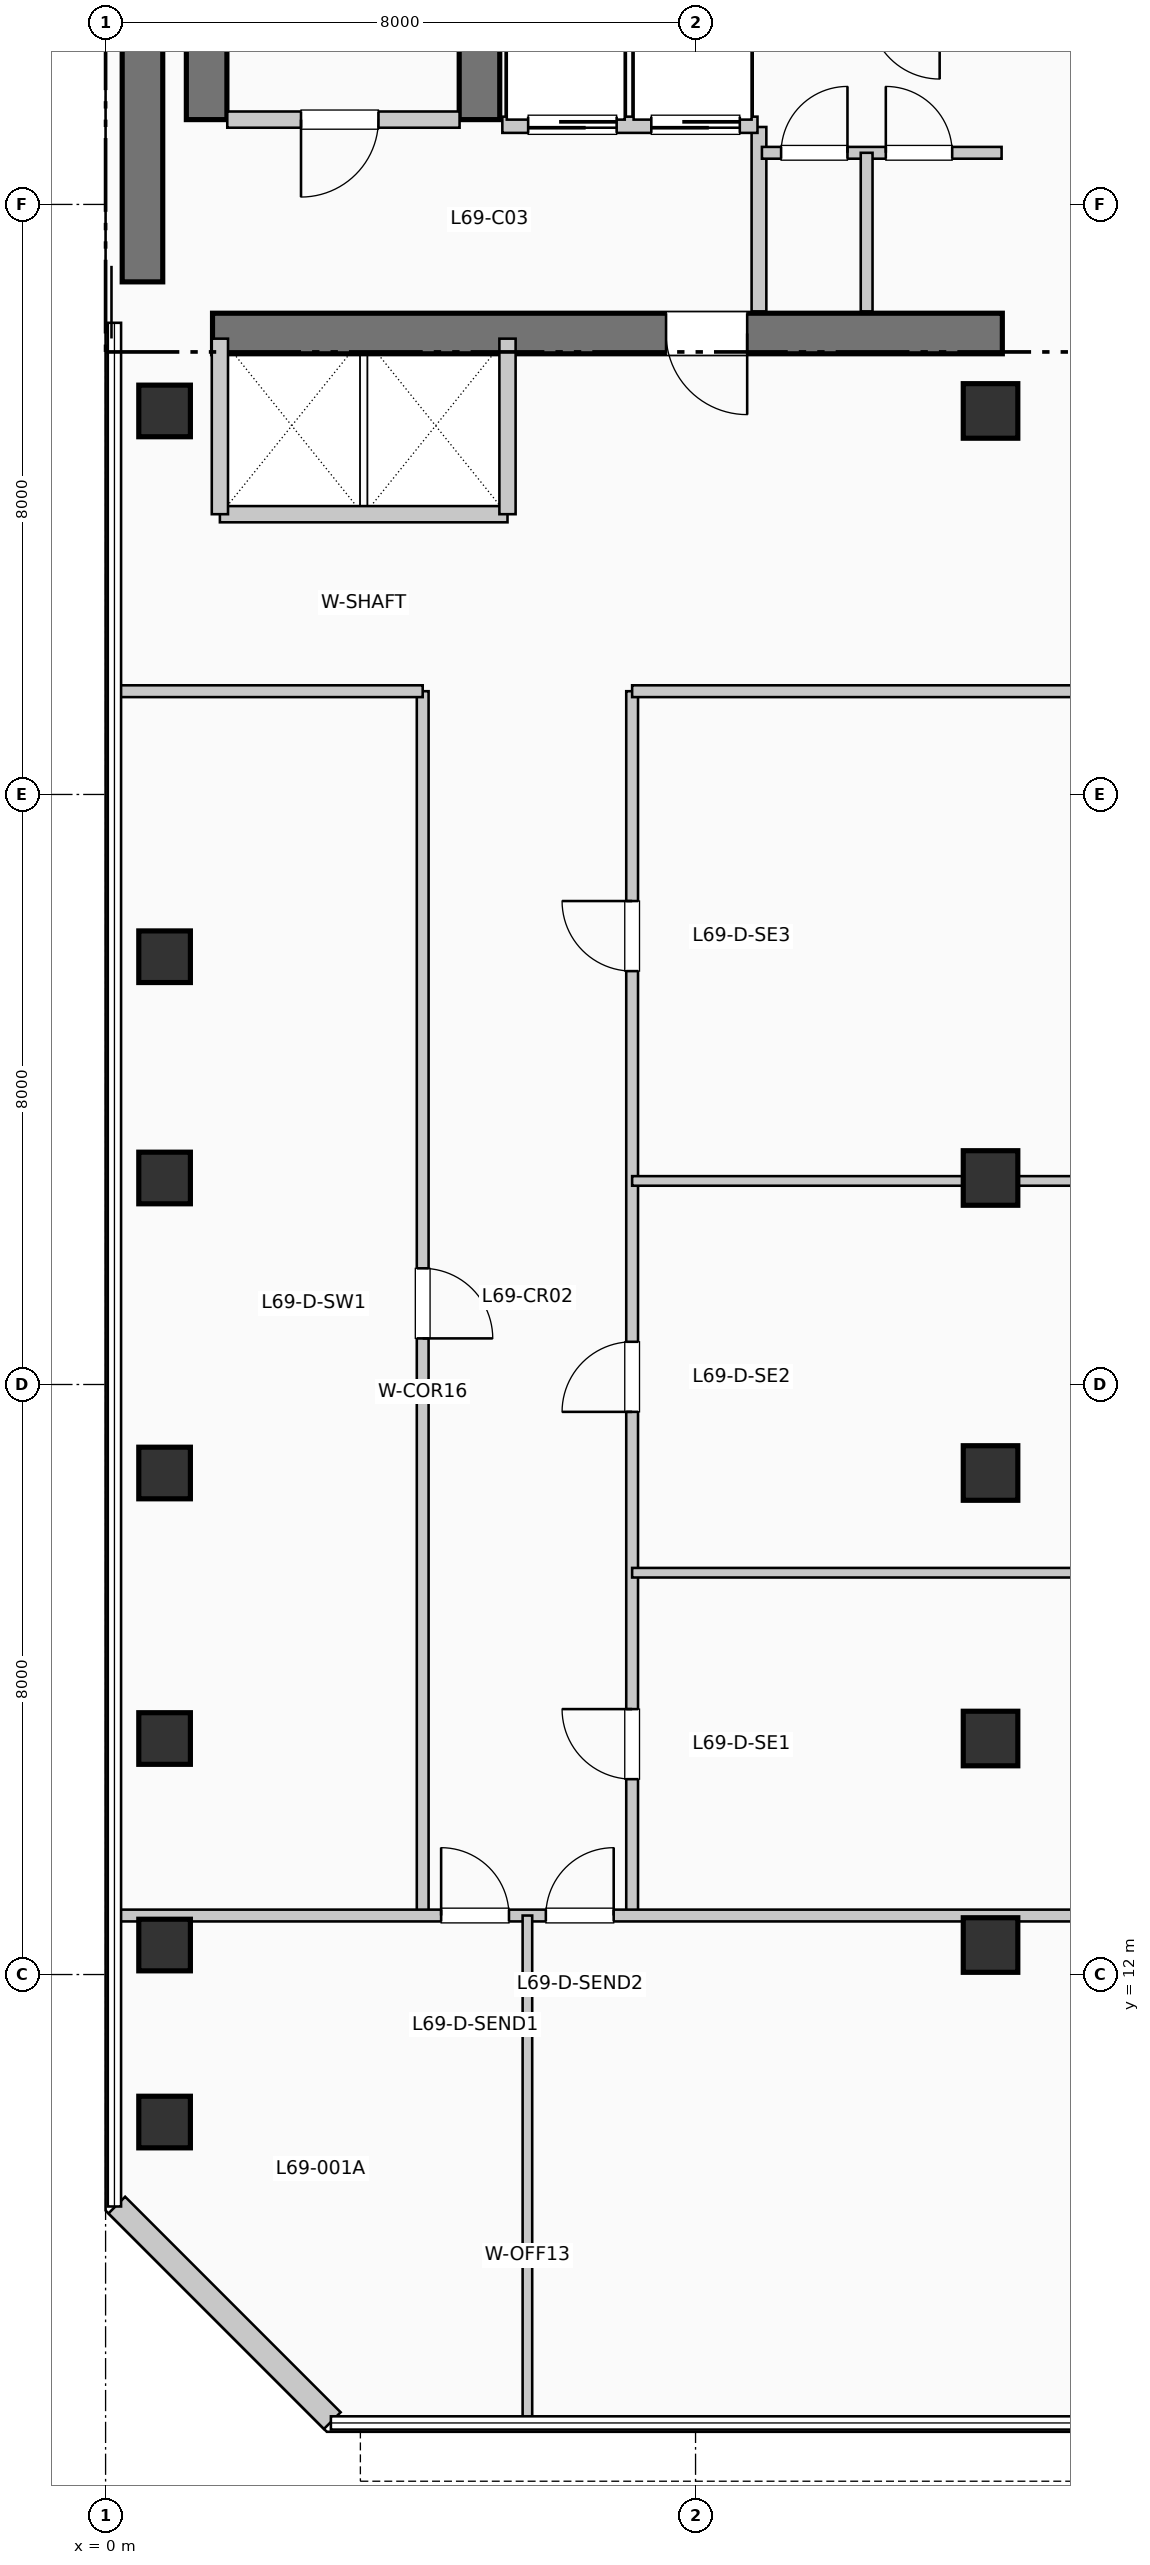
"""IFC4 building model, lengths in metres.
Left out: names, types, materials, properties, quantities, classifications, styles, units other than length and angle.
Written with IfcOpenShell. Run it as: python <this file> out.ifc"""

import sys

from ifc_helpers import new_model, si_unit, direction, frame, frame_2d, origin, origin_2d, place, context, subcontext, project, spatial, rectangle, extrude, element, fill, save


model = new_model("IFC4")
c1 = context("Model", 3, precision=1e-05, world=origin(), true_north=direction((0.0, 1.0)))
c2 = subcontext(c1, "Body", "Model", "MODEL_VIEW")
j1 = project(units=[si_unit("LENGTHUNIT", "METRE"), si_unit("PLANEANGLEUNIT", "RADIAN")], contexts=[c1])
p1 = place(None, origin())
s1 = spatial("IfcSite", under=j1, at=p1, CompositionType="ELEMENT")
p2 = place(p1, origin())
s2 = spatial("IfcBuilding", under=s1, at=p2, CompositionType="ELEMENT")
p3 = place(p2, frame((0.0, 0.0, 284.13)))
s3 = spatial("IfcBuildingStorey", under=s2, at=p3, CompositionType="ELEMENT", Elevation=284.13)
p4 = place(p3, frame((0.5, 34.95, 0.0), z_axis=(0.0, 0.0, 1.0), x_axis=(0.0, 1.0, 0.0)))
e1 = element("IfcWall", 1, at=p4, inside=s3, PredefinedType="SHEAR", context=c2, shape_type="SweptSolid", body=[
    extrude(rectangle(XDim=7.9, YDim=0.55, at=frame_2d((3.95, 0.0))), origin(), (0.0, 0.0, 1.0), 3.96),
])
p5 = place(p3, frame((1.45, 34.25, 0.0), z_axis=(0.0, 0.0, 1.0), x_axis=(1.0, 0.0, 0.0)))
e2 = element("IfcWall", 2, at=p5, inside=s3, PredefinedType="SHEAR", context=c2, shape_type="SweptSolid", body=[
    extrude(rectangle(XDim=10.71, YDim=0.55, at=frame_2d((5.355, 0.0))), origin(), (0.0, 0.0, 1.0), 3.96),
])
p6 = place(p5, frame((7.25, 0.0, 0.0), z_axis=(0.0, 0.0, 1.0), x_axis=(-1.0, 0.0, 0.0)))
e3 = element("IfcOpeningElement", 3, at=p6, cuts=e2, PredefinedType="OPENING", context=c2, shape_type="SweptSolid", body=[
    extrude(rectangle(XDim=1.1, YDim=2.15, at=frame_2d((0.55, 1.075))), frame((0.0, 0.285, 0.0), z_axis=(0.0, -1.0, 0.0), x_axis=(1.0, 0.0, 0.0)), (0.0, 0.0, 1.0), 0.57),
])
for number, where, z_axis, x_axis in (
    (4, (1.37, 37.15, 0.0), (0.0, 0.0, 1.0), (0.0, 1.0, 0.0)),
    (5, (5.07, 37.15, 0.0), (0.0, 0.0, 1.0), (0.0, 1.0, 0.0)),
):
    element("IfcWall", number, at=place(p3, frame(where, z_axis=z_axis, x_axis=x_axis)), inside=s3, PredefinedType="SHEAR", context=c2, shape_type="SweptSolid", body=[
        extrude(rectangle(XDim=7.89, YDim=0.55, at=frame_2d((3.945, 0.0))), origin(), (0.0, 0.0, 1.0), 3.96),
    ])
for number, where, z_axis, x_axis in (
    (6, (0.8, 10.0, 0.0), (0.0, 0.0, 1.0), (1.0, 0.0, 0.0)),
    (7, (0.8, 12.4, 0.0), (0.0, 0.0, 1.0), (1.0, 0.0, 0.0)),
    (8, (0.8, 15.2, 0.0), (0.0, 0.0, 1.0), (1.0, 0.0, 0.0)),
    (9, (0.8, 18.8, 0.0), (0.0, 0.0, 1.0), (1.0, 0.0, 0.0)),
    (10, (0.8, 22.8, 0.0), (0.0, 0.0, 1.0), (1.0, 0.0, 0.0)),
    (11, (0.8, 25.8, 0.0), (0.0, 0.0, 1.0), (1.0, 0.0, 0.0)),
    (12, (0.8, 33.2, 0.0), (0.0, 0.0, 1.0), (1.0, 0.0, 0.0)),
):
    element("IfcColumn", number, at=place(p3, frame(where, z_axis=z_axis, x_axis=x_axis)), inside=s3, PredefinedType="COLUMN", context=c2, shape_type="SweptSolid", body=[
        extrude(rectangle(XDim=0.7, YDim=0.7, at=origin_2d()), origin(), (0.0, 0.0, 1.0), 3.96),
    ])
for number, where, z_axis, x_axis in (
    (13, (12.0, 12.4, 0.0), (0.0, 0.0, 1.0), (1.0, 0.0, 0.0)),
    (14, (12.0, 15.2, 0.0), (0.0, 0.0, 1.0), (1.0, 0.0, 0.0)),
    (15, (12.0, 18.8, 0.0), (0.0, 0.0, 1.0), (1.0, 0.0, 0.0)),
    (16, (12.0, 22.8, 0.0), (0.0, 0.0, 1.0), (1.0, 0.0, 0.0)),
    (17, (12.0, 33.2, 0.0), (0.0, 0.0, 1.0), (1.0, 0.0, 0.0)),
):
    element("IfcColumn", number, at=place(p3, frame(where, z_axis=z_axis, x_axis=x_axis)), inside=s3, PredefinedType="COLUMN", context=c2, shape_type="SweptSolid", body=[
        extrude(rectangle(XDim=0.74, YDim=0.74, at=origin_2d()), origin(), (0.0, 0.0, 1.0), 3.96),
    ])
p7 = place(p3, frame((0.152, 8.874, 0.0), z_axis=(0.0, 0.0, 1.0), x_axis=(0.707077242712, -0.707136318428, 0.0)))
e18 = element("IfcWall", 18, at=p7, inside=s3, PredefinedType="SOLIDWALL", context=c2, shape_type="SweptSolid", body=[
    extrude(rectangle(XDim=4.133, YDim=0.32, at=frame_2d((2.066, 0.0))), origin(), (0.0, 0.0, 1.0), 3.74),
])
p8 = place(p3, frame((1.65, 37.15, 0.0), z_axis=(0.0, 0.0, 1.0), x_axis=(1.0, 0.0, 0.0)))
e19 = element("IfcWall", 19, at=p8, inside=s3, PredefinedType="PARTITIONING", context=c2, shape_type="SweptSolid", body=[
    extrude(rectangle(XDim=3.15, YDim=0.22, at=frame_2d((1.575, 0.0))), origin(), (0.0, 0.0, 1.0), 3.74),
])
p9 = place(p8, frame((2.05, 0.0, 0.0), z_axis=(0.0, 0.0, 1.0), x_axis=(-1.0, 0.0, 0.0)))
e20 = element("IfcOpeningElement", 20, at=p9, cuts=e19, PredefinedType="OPENING", context=c2, shape_type="SweptSolid", body=[
    extrude(rectangle(XDim=1.05, YDim=2.15, at=frame_2d((0.525, 1.075))), frame((0.0, 0.12, 0.0), z_axis=(0.0, -1.0, 0.0), x_axis=(1.0, 0.0, 0.0)), (0.0, 0.0, 1.0), 0.24),
])
p10 = place(p3, frame((8.86, 34.55, 0.0), z_axis=(0.0, 0.0, 1.0), x_axis=(0.0, 1.0, 0.0)))
e21 = element("IfcWall", 21, at=p10, inside=s3, PredefinedType="PARTITIONING", context=c2, shape_type="SweptSolid", body=[
    extrude(rectangle(XDim=2.5, YDim=0.2, at=frame_2d((1.25, 0.0))), origin(), (0.0, 0.0, 1.0), 3.74),
])
p11 = place(p3, frame((5.38, 37.08, 0.0), z_axis=(0.0, 0.0, 1.0), x_axis=(1.0, 0.0, 0.0)))
e22 = element("IfcWall", 22, at=p11, inside=s3, PredefinedType="PARTITIONING", context=c2, shape_type="SweptSolid", body=[
    extrude(rectangle(XDim=3.46, YDim=0.22, at=frame_2d((1.73, 0.0))), origin(), (0.0, 0.0, 1.0), 3.74),
])
p12 = place(p11, frame((1.55, 0.0, 0.0), z_axis=(0.0, 0.0, 1.0), x_axis=(-1.0, 0.0, 0.0)))
e23 = element("IfcOpeningElement", 23, at=p12, cuts=e22, PredefinedType="OPENING", context=c2, shape_type="SweptSolid", body=[
    extrude(rectangle(XDim=1.2, YDim=2.2, at=frame_2d((0.6, 1.1))), frame((0.0, 0.12, 0.0), z_axis=(0.0, -1.0, 0.0), x_axis=(1.0, 0.0, 0.0)), (0.0, 0.0, 1.0), 0.24),
])
p13 = place(p11, frame((3.22, 0.0, 0.0), z_axis=(0.0, 0.0, 1.0), x_axis=(-1.0, 0.0, 0.0)))
e24 = element("IfcOpeningElement", 24, at=p13, cuts=e22, PredefinedType="OPENING", context=c2, shape_type="SweptSolid", body=[
    extrude(rectangle(XDim=1.2, YDim=2.2, at=frame_2d((0.6, 1.1))), frame((0.0, 0.12, 0.0), z_axis=(0.0, -1.0, 0.0), x_axis=(1.0, 0.0, 0.0)), (0.0, 0.0, 1.0), 0.24),
])
p14 = place(p3, frame((1.55, 31.8, 0.0), z_axis=(0.0, 0.0, 1.0), x_axis=(1.0, 0.0, 0.0)))
e25 = element("IfcWall", 25, at=p14, inside=s3, PredefinedType="PARTITIONING", context=c2, shape_type="SweptSolid", body=[
    extrude(rectangle(XDim=3.9, YDim=0.22, at=frame_2d((1.95, 0.0))), origin(), (0.0, 0.0, 1.0), 3.74),
])
for number, where, z_axis, x_axis in (
    (26, (1.55, 31.8, 0.0), (0.0, 0.0, 1.0), (0.0, 1.0, 0.0)),
    (27, (5.45, 31.8, 0.0), (0.0, 0.0, 1.0), (0.0, 1.0, 0.0)),
):
    element("IfcWall", number, at=place(p3, frame(where, z_axis=z_axis, x_axis=x_axis)), inside=s3, PredefinedType="PARTITIONING", context=c2, shape_type="SweptSolid", body=[
        extrude(rectangle(XDim=2.38, YDim=0.22, at=frame_2d((1.19, 0.0))), origin(), (0.0, 0.0, 1.0), 3.74),
    ])
p15 = place(p3, frame((8.9, 36.7, 0.0), z_axis=(0.0, 0.0, 1.0), x_axis=(1.0, 0.0, 0.0)))
e28 = element("IfcWall", 28, at=p15, inside=s3, PredefinedType="PARTITIONING", context=c2, shape_type="SweptSolid", body=[
    extrude(rectangle(XDim=3.25, YDim=0.16, at=frame_2d((1.625, 0.0))), origin(), (0.0, 0.0, 1.0), 3.74),
])
p16 = place(p15, frame((0.26, 0.0, 0.0)))
e29 = element("IfcOpeningElement", 29, at=p16, cuts=e28, PredefinedType="OPENING", context=c2, shape_type="SweptSolid", body=[
    extrude(rectangle(XDim=0.9, YDim=2.15, at=frame_2d((0.45, 1.075))), frame((0.0, 0.09, 0.0), z_axis=(0.0, -1.0, 0.0), x_axis=(1.0, 0.0, 0.0)), (0.0, 0.0, 1.0), 0.18),
])
p17 = place(p15, frame((1.68, 0.0, 0.0)))
e30 = element("IfcOpeningElement", 30, at=p17, cuts=e28, PredefinedType="OPENING", context=c2, shape_type="SweptSolid", body=[
    extrude(rectangle(XDim=0.9, YDim=2.15, at=frame_2d((0.45, 1.075))), frame((0.0, 0.09, 0.0), z_axis=(0.0, -1.0, 0.0), x_axis=(1.0, 0.0, 0.0)), (0.0, 0.0, 1.0), 0.18),
])
p18 = place(p3, frame((10.32, 34.55, 0.0), z_axis=(0.0, 0.0, 1.0), x_axis=(0.0, 1.0, 0.0)))
e31 = element("IfcWall", 31, at=p18, inside=s3, PredefinedType="PARTITIONING", context=c2, shape_type="SweptSolid", body=[
    extrude(rectangle(XDim=2.15, YDim=0.16, at=frame_2d((1.075, 0.0))), origin(), (0.0, 0.0, 1.0), 3.74),
])
p19 = place(p3, frame((4.3, 12.8, 0.0), z_axis=(0.0, 0.0, 1.0), x_axis=(0.0, 1.0, 0.0)))
e32 = element("IfcWall", 32, at=p19, inside=s3, PredefinedType="PARTITIONING", context=c2, shape_type="SweptSolid", body=[
    extrude(rectangle(XDim=16.6, YDim=0.16, at=frame_2d((8.3, 0.0))), origin(), (0.0, 0.0, 1.0), 3.74),
])
p20 = place(p19, frame((8.775, 0.0, 0.0), z_axis=(0.0, 0.0, 1.0), x_axis=(-1.0, 0.0, 0.0)))
e33 = element("IfcOpeningElement", 33, at=p20, cuts=e32, PredefinedType="OPENING", context=c2, shape_type="SweptSolid", body=[
    extrude(rectangle(XDim=0.95, YDim=2.15, at=frame_2d((0.475, 1.075))), frame((0.0, 0.09, 0.0), z_axis=(0.0, -1.0, 0.0), x_axis=(1.0, 0.0, 0.0)), (0.0, 0.0, 1.0), 0.18),
])
p21 = place(p3, frame((7.14, 12.8, 0.0), z_axis=(0.0, 0.0, 1.0), x_axis=(0.0, 1.0, 0.0)))
e34 = element("IfcWall", 34, at=p21, inside=s3, PredefinedType="PARTITIONING", context=c2, shape_type="SweptSolid", body=[
    extrude(rectangle(XDim=16.6, YDim=0.16, at=frame_2d((8.3, 0.0))), origin(), (0.0, 0.0, 1.0), 3.74),
])
p22 = place(p21, frame((1.849, 0.0, 0.0)))
e35 = element("IfcOpeningElement", 35, at=p22, cuts=e34, PredefinedType="OPENING", context=c2, shape_type="SweptSolid", body=[
    extrude(rectangle(XDim=0.95, YDim=2.15, at=frame_2d((0.475, 1.075))), frame((0.0, 0.09, 0.0), z_axis=(0.0, -1.0, 0.0), x_axis=(1.0, 0.0, 0.0)), (0.0, 0.0, 1.0), 0.18),
])
p23 = place(p21, frame((6.829, 0.0, 0.0)))
e36 = element("IfcOpeningElement", 36, at=p23, cuts=e34, PredefinedType="OPENING", context=c2, shape_type="SweptSolid", body=[
    extrude(rectangle(XDim=0.95, YDim=2.15, at=frame_2d((0.475, 1.075))), frame((0.0, 0.09, 0.0), z_axis=(0.0, -1.0, 0.0), x_axis=(1.0, 0.0, 0.0)), (0.0, 0.0, 1.0), 0.18),
])
p24 = place(p21, frame((12.805, 0.0, 0.0)))
e37 = element("IfcOpeningElement", 37, at=p24, cuts=e34, PredefinedType="OPENING", context=c2, shape_type="SweptSolid", body=[
    extrude(rectangle(XDim=0.95, YDim=2.15, at=frame_2d((0.475, 1.075))), frame((0.0, 0.09, 0.0), z_axis=(0.0, -1.0, 0.0), x_axis=(1.0, 0.0, 0.0)), (0.0, 0.0, 1.0), 0.18),
])
p25 = place(p3, frame((0.19, 12.8, 0.0), z_axis=(0.0, 0.0, 1.0), x_axis=(1.0, 0.0, 0.0)))
e38 = element("IfcWall", 38, at=p25, inside=s3, PredefinedType="PARTITIONING", context=c2, shape_type="SweptSolid", body=[
    extrude(rectangle(XDim=23.26, YDim=0.16, at=frame_2d((11.63, 0.0))), origin(), (0.0, 0.0, 1.0), 3.175),
])
p26 = place(p25, frame((4.36, 0.0, 0.0)))
e39 = element("IfcOpeningElement", 39, at=p26, cuts=e38, PredefinedType="OPENING", context=c2, shape_type="SweptSolid", body=[
    extrude(rectangle(XDim=0.92, YDim=2.1, at=frame_2d((0.46, 1.05))), frame((0.0, 0.09, 0.0), z_axis=(0.0, -1.0, 0.0), x_axis=(1.0, 0.0, 0.0)), (0.0, 0.0, 1.0), 0.18),
])
p27 = place(p25, frame((5.78, 0.0, 0.0)))
e40 = element("IfcOpeningElement", 40, at=p27, cuts=e38, PredefinedType="OPENING", context=c2, shape_type="SweptSolid", body=[
    extrude(rectangle(XDim=0.92, YDim=2.1, at=frame_2d((0.46, 1.05))), frame((0.0, 0.09, 0.0), z_axis=(0.0, -1.0, 0.0), x_axis=(1.0, 0.0, 0.0)), (0.0, 0.0, 1.0), 0.18),
])
p28 = place(p3, frame((0.19, 29.4, 0.0), z_axis=(0.0, 0.0, 1.0), x_axis=(1.0, 0.0, 0.0)))
e41 = element("IfcWall", 41, at=p28, inside=s3, PredefinedType="PARTITIONING", context=c2, shape_type="SweptSolid", body=[
    extrude(rectangle(XDim=4.11, YDim=0.16, at=frame_2d((2.055, 0.0))), origin(), (0.0, 0.0, 1.0), 3.425),
])
p29 = place(p3, frame((7.14, 29.4, 0.0), z_axis=(0.0, 0.0, 1.0), x_axis=(1.0, 0.0, 0.0)))
e42 = element("IfcWall", 42, at=p29, inside=s3, PredefinedType="PARTITIONING", context=c2, shape_type="SweptSolid", body=[
    extrude(rectangle(XDim=16.31, YDim=0.16, at=frame_2d((8.155, 0.0))), origin(), (0.0, 0.0, 1.0), 3.425),
])
p30 = place(p3, frame((5.72, 5.99, 0.0), z_axis=(0.0, 0.0, 1.0), x_axis=(0.0, 1.0, 0.0)))
e43 = element("IfcWall", 43, at=p30, inside=s3, PredefinedType="PARTITIONING", context=c2, shape_type="SweptSolid", body=[
    extrude(rectangle(XDim=6.81, YDim=0.13, at=frame_2d((3.405, 0.0))), origin(), (0.0, 0.0, 1.0), 3.74),
])
p31 = place(p3, frame((7.14, 17.448, 0.0), z_axis=(0.0, 0.0, 1.0), x_axis=(1.0, 0.0, 0.0)))
e44 = element("IfcWall", 44, at=p31, inside=s3, PredefinedType="PARTITIONING", context=c2, shape_type="SweptSolid", body=[
    extrude(rectangle(XDim=16.31, YDim=0.13, at=frame_2d((8.155, 0.0))), origin(), (0.0, 0.0, 1.0), 3.74),
])
p32 = place(p3, frame((7.14, 22.76, 0.0), z_axis=(0.0, 0.0, 1.0), x_axis=(1.0, 0.0, 0.0)))
e45 = element("IfcWall", 45, at=p32, inside=s3, PredefinedType="PARTITIONING", context=c2, shape_type="SweptSolid", body=[
    extrude(rectangle(XDim=16.31, YDim=0.13, at=frame_2d((8.155, 0.0))), origin(), (0.0, 0.0, 1.0), 3.175),
])
p33 = place(p9, origin())
e46 = element("IfcDoor", 46, at=p33, inside=s3, OperationType="SINGLE_SWING_LEFT", PredefinedType="DOOR", context=c2, shape_type="SweptSolid", body=[
    extrude(rectangle(XDim=1.05, YDim=2.15, at=frame_2d((0.525, 1.075))), frame((0.0, 0.025, 0.0), z_axis=(0.0, -1.0, 0.0), x_axis=(1.0, 0.0, 0.0)), (0.0, 0.0, 1.0), 0.05),
])
fill(e20, e46)
p34 = place(p6, origin())
e47 = element("IfcDoor", 47, at=p34, inside=s3, OperationType="SINGLE_SWING_RIGHT", PredefinedType="DOOR", context=c2, shape_type="SweptSolid", body=[
    extrude(rectangle(XDim=1.1, YDim=2.15, at=frame_2d((0.55, 1.075))), frame((0.0, 0.025, 0.0), z_axis=(0.0, -1.0, 0.0), x_axis=(1.0, 0.0, 0.0)), (0.0, 0.0, 1.0), 0.05),
])
fill(e3, e47)
p35 = place(p12, origin())
e48 = element("IfcDoor", 48, at=p35, inside=s3, OperationType="SLIDING_TO_RIGHT", PredefinedType="DOOR", context=c2, shape_type="SweptSolid", body=[
    extrude(rectangle(XDim=1.2, YDim=2.2, at=frame_2d((0.6, 1.1))), frame((0.0, 0.025, 0.0), z_axis=(0.0, -1.0, 0.0), x_axis=(1.0, 0.0, 0.0)), (0.0, 0.0, 1.0), 0.05),
])
fill(e23, e48)
p36 = place(p13, origin())
e49 = element("IfcDoor", 49, at=p36, inside=s3, OperationType="SLIDING_TO_RIGHT", PredefinedType="DOOR", context=c2, shape_type="SweptSolid", body=[
    extrude(rectangle(XDim=1.2, YDim=2.2, at=frame_2d((0.6, 1.1))), frame((0.0, 0.025, 0.0), z_axis=(0.0, -1.0, 0.0), x_axis=(1.0, 0.0, 0.0)), (0.0, 0.0, 1.0), 0.05),
])
fill(e24, e49)
p37 = place(p16, origin())
e50 = element("IfcDoor", 50, at=p37, inside=s3, OperationType="SINGLE_SWING_RIGHT", PredefinedType="DOOR", context=c2, shape_type="SweptSolid", body=[
    extrude(rectangle(XDim=0.9, YDim=2.15, at=frame_2d((0.45, 1.075))), frame((0.0, 0.025, 0.0), z_axis=(0.0, -1.0, 0.0), x_axis=(1.0, 0.0, 0.0)), (0.0, 0.0, 1.0), 0.05),
])
fill(e29, e50)
p38 = place(p17, origin())
e51 = element("IfcDoor", 51, at=p38, inside=s3, OperationType="SINGLE_SWING_LEFT", PredefinedType="DOOR", context=c2, shape_type="SweptSolid", body=[
    extrude(rectangle(XDim=0.9, YDim=2.15, at=frame_2d((0.45, 1.075))), frame((0.0, 0.025, 0.0), z_axis=(0.0, -1.0, 0.0), x_axis=(1.0, 0.0, 0.0)), (0.0, 0.0, 1.0), 0.05),
])
fill(e30, e51)
p39 = place(p26, origin())
e52 = element("IfcDoor", 52, at=p39, inside=s3, OperationType="SINGLE_SWING_LEFT", PredefinedType="DOOR", context=c2, shape_type="SweptSolid", body=[
    extrude(rectangle(XDim=0.92, YDim=2.1, at=frame_2d((0.46, 1.05))), frame((0.0, 0.025, 0.0), z_axis=(0.0, -1.0, 0.0), x_axis=(1.0, 0.0, 0.0)), (0.0, 0.0, 1.0), 0.05),
])
fill(e39, e52)
p40 = place(p27, origin())
e53 = element("IfcDoor", 53, at=p40, inside=s3, OperationType="SINGLE_SWING_RIGHT", PredefinedType="DOOR", context=c2, shape_type="SweptSolid", body=[
    extrude(rectangle(XDim=0.92, YDim=2.1, at=frame_2d((0.46, 1.05))), frame((0.0, 0.025, 0.0), z_axis=(0.0, -1.0, 0.0), x_axis=(1.0, 0.0, 0.0)), (0.0, 0.0, 1.0), 0.05),
])
fill(e40, e53)
p41 = place(p20, origin())
e54 = element("IfcDoor", 54, at=p41, inside=s3, OperationType="SINGLE_SWING_LEFT", PredefinedType="DOOR", context=c2, shape_type="SweptSolid", body=[
    extrude(rectangle(XDim=0.95, YDim=2.15, at=frame_2d((0.475, 1.075))), frame((0.0, 0.025, 0.0), z_axis=(0.0, -1.0, 0.0), x_axis=(1.0, 0.0, 0.0)), (0.0, 0.0, 1.0), 0.05),
])
fill(e33, e54)
p42 = place(p22, origin())
e55 = element("IfcDoor", 55, at=p42, inside=s3, OperationType="SINGLE_SWING_RIGHT", PredefinedType="DOOR", context=c2, shape_type="SweptSolid", body=[
    extrude(rectangle(XDim=0.95, YDim=2.15, at=frame_2d((0.475, 1.075))), frame((0.0, 0.025, 0.0), z_axis=(0.0, -1.0, 0.0), x_axis=(1.0, 0.0, 0.0)), (0.0, 0.0, 1.0), 0.05),
])
fill(e35, e55)
p43 = place(p23, origin())
e56 = element("IfcDoor", 56, at=p43, inside=s3, OperationType="SINGLE_SWING_LEFT", PredefinedType="DOOR", context=c2, shape_type="SweptSolid", body=[
    extrude(rectangle(XDim=0.95, YDim=2.15, at=frame_2d((0.475, 1.075))), frame((0.0, 0.025, 0.0), z_axis=(0.0, -1.0, 0.0), x_axis=(1.0, 0.0, 0.0)), (0.0, 0.0, 1.0), 0.05),
])
fill(e36, e56)
p44 = place(p24, origin())
e57 = element("IfcDoor", 57, at=p44, inside=s3, OperationType="SINGLE_SWING_RIGHT", PredefinedType="DOOR", context=c2, shape_type="SweptSolid", body=[
    extrude(rectangle(XDim=0.95, YDim=2.15, at=frame_2d((0.475, 1.075))), frame((0.0, 0.025, 0.0), z_axis=(0.0, -1.0, 0.0), x_axis=(1.0, 0.0, 0.0)), (0.0, 0.0, 1.0), 0.05),
])
fill(e37, e57)
save(model, sys.argv[1])
